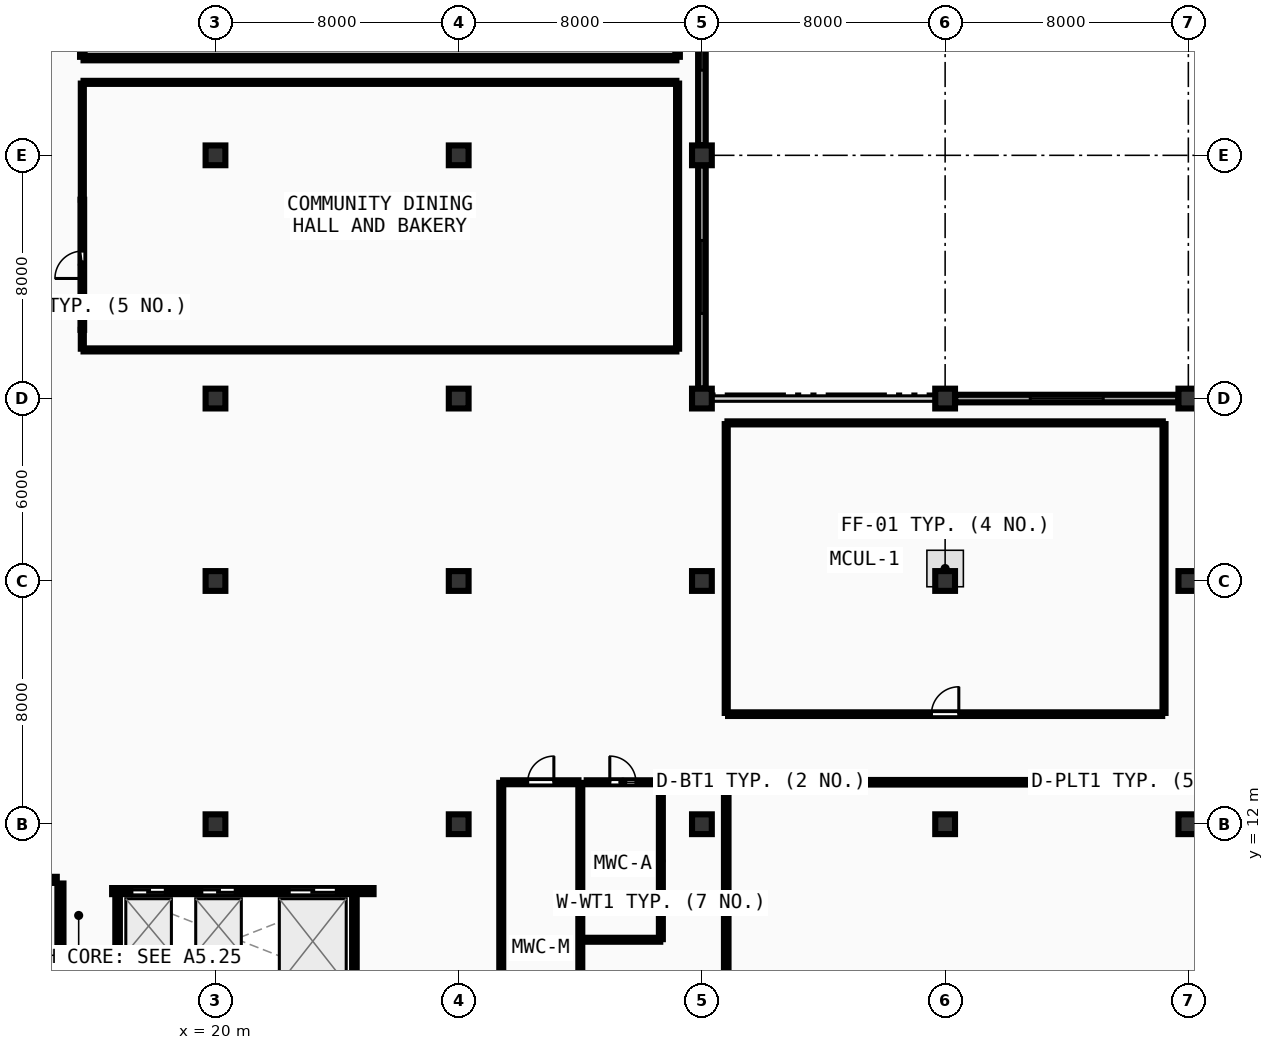
"""IFC4 building model, lengths in metres.
Left out: names, types, materials, properties, quantities, classifications, styles, units other than length and angle.
Written with IfcOpenShell. Run it as: python <this file> out.ifc"""

import sys

from ifc_helpers import new_model, si_unit, direction, frame, frame_2d, origin, origin_2d, place, context, subcontext, project, spatial, rectangle, extrude, element, fill, save


model = new_model("IFC4")
c1 = context("Model", 3, precision=1e-05, world=origin(), true_north=direction((0.0, 1.0)))
c2 = subcontext(c1, "Body", "Model", "MODEL_VIEW")
j1 = project(units=[si_unit("LENGTHUNIT", "METRE"), si_unit("PLANEANGLEUNIT", "RADIAN")], contexts=[c1])
p1 = place(None, origin())
s1 = spatial("IfcSite", under=j1, at=p1, CompositionType="ELEMENT")
p2 = place(p1, origin())
s2 = spatial("IfcBuilding", under=s1, at=p2, CompositionType="ELEMENT")
p3 = place(p2, frame((0.0, 0.0, 13.5)))
s3 = spatial("IfcBuildingStorey", under=s2, at=p3, CompositionType="ELEMENT", Elevation=13.5)
for number, where, z_axis, x_axis in (
    (1, (20.0, 12.0, 0.0), (0.0, 0.0, 1.0), (1.0, 0.0, 0.0)),
    (2, (20.0, 20.0, 0.0), (0.0, 0.0, 1.0), (1.0, 0.0, 0.0)),
    (3, (20.0, 26.0, 0.0), (0.0, 0.0, 1.0), (1.0, 0.0, 0.0)),
    (4, (20.0, 34.0, 0.0), (0.0, 0.0, 1.0), (1.0, 0.0, 0.0)),
    (5, (28.0, 12.0, 0.0), (0.0, 0.0, 1.0), (1.0, 0.0, 0.0)),
    (6, (28.0, 20.0, 0.0), (0.0, 0.0, 1.0), (1.0, 0.0, 0.0)),
    (7, (28.0, 26.0, 0.0), (0.0, 0.0, 1.0), (1.0, 0.0, 0.0)),
    (8, (28.0, 34.0, 0.0), (0.0, 0.0, 1.0), (1.0, 0.0, 0.0)),
    (9, (36.0, 12.0, 0.0), (0.0, 0.0, 1.0), (1.0, 0.0, 0.0)),
    (10, (36.0, 20.0, 0.0), (0.0, 0.0, 1.0), (1.0, 0.0, 0.0)),
    (11, (36.0, 26.0, 0.0), (0.0, 0.0, 1.0), (1.0, 0.0, 0.0)),
    (12, (36.0, 34.0, 0.0), (0.0, 0.0, 1.0), (1.0, 0.0, 0.0)),
    (13, (44.0, 12.0, 0.0), (0.0, 0.0, 1.0), (1.0, 0.0, 0.0)),
    (14, (44.0, 20.0, 0.0), (0.0, 0.0, 1.0), (1.0, 0.0, 0.0)),
    (15, (44.0, 26.0, 0.0), (0.0, 0.0, 1.0), (1.0, 0.0, 0.0)),
    (16, (52.0, 12.0, 0.0), (0.0, 0.0, 1.0), (1.0, 0.0, 0.0)),
    (17, (52.0, 20.0, 0.0), (0.0, 0.0, 1.0), (1.0, 0.0, 0.0)),
    (18, (52.0, 26.0, 0.0), (0.0, 0.0, 1.0), (1.0, 0.0, 0.0)),
):
    element("IfcColumn", number, at=place(p3, frame(where, z_axis=z_axis, x_axis=x_axis)), inside=s3, PredefinedType="COLUMN", context=c2, shape_type="SweptSolid", body=[
        extrude(rectangle(XDim=0.65, YDim=0.65, at=origin_2d()), origin(), (0.0, 0.0, 1.0), 4.5),
    ])
p4 = place(p3, frame((51.67, 26.0, 0.0), z_axis=(0.0, 0.0, 1.0), x_axis=(-1.0, 0.0, 0.0)))
e19 = element("IfcWall", 19, at=p4, inside=s3, PredefinedType="SOLIDWALL", context=c2, shape_type="SweptSolid", body=[
    extrude(rectangle(XDim=7.34, YDim=0.25, at=frame_2d((3.67, 0.0))), origin(), (0.0, 0.0, 1.0), 3.42),
])
p5 = place(p4, frame((2.47, 0.0, 0.95)))
e20 = element("IfcOpeningElement", 20, at=p5, cuts=e19, PredefinedType="OPENING", context=c2, shape_type="SweptSolid", body=[
    extrude(rectangle(XDim=2.4, YDim=1.65, at=frame_2d((1.2, 0.825))), frame((0.0, 0.135, 0.0), z_axis=(0.0, -1.0, 0.0), x_axis=(1.0, 0.0, 0.0)), (0.0, 0.0, 1.0), 0.27),
])
p6 = place(p3, frame((36.0, 26.33, 0.0), z_axis=(0.0, 0.0, 1.0), x_axis=(0.0, 1.0, 0.0)))
e21 = element("IfcWall", 21, at=p6, inside=s3, PredefinedType="SOLIDWALL", context=c2, shape_type="SweptSolid", body=[
    extrude(rectangle(XDim=7.34, YDim=0.25, at=frame_2d((3.67, 0.0))), origin(), (0.0, 0.0, 1.0), 3.42),
])
p7 = place(p6, frame((2.47, 0.0, 0.95)))
e22 = element("IfcOpeningElement", 22, at=p7, cuts=e21, PredefinedType="OPENING", context=c2, shape_type="SweptSolid", body=[
    extrude(rectangle(XDim=2.4, YDim=1.65, at=frame_2d((1.2, 0.825))), frame((0.0, 0.135, 0.0), z_axis=(0.0, -1.0, 0.0), x_axis=(1.0, 0.0, 0.0)), (0.0, 0.0, 1.0), 0.27),
])
p8 = place(p3, frame((36.0, 34.33, 0.0), z_axis=(0.0, 0.0, 1.0), x_axis=(0.0, 1.0, 0.0)))
e23 = element("IfcWall", 23, at=p8, inside=s3, PredefinedType="SOLIDWALL", context=c2, shape_type="SweptSolid", body=[
    extrude(rectangle(XDim=7.34, YDim=0.25, at=frame_2d((3.67, 0.0))), origin(), (0.0, 0.0, 1.0), 3.42),
])
p9 = place(p8, frame((2.47, 0.0, 0.95)))
e24 = element("IfcOpeningElement", 24, at=p9, cuts=e23, PredefinedType="OPENING", context=c2, shape_type="SweptSolid", body=[
    extrude(rectangle(XDim=2.4, YDim=1.65, at=frame_2d((1.2, 0.825))), frame((0.0, 0.135, 0.0), z_axis=(0.0, -1.0, 0.0), x_axis=(1.0, 0.0, 0.0)), (0.0, 0.0, 1.0), 0.27),
])
p10 = place(p3, frame((14.9, 6.58, 0.0), z_axis=(0.0, 0.0, 1.0), x_axis=(0.0, 1.0, 0.0)))
e25 = element("IfcWall", 25, at=p10, inside=s3, PredefinedType="SHEAR", context=c2, shape_type="SweptSolid", body=[
    extrude(rectangle(XDim=3.47, YDim=0.2, at=frame_2d((1.735, 0.0))), origin(), (0.0, 0.0, 1.0), 4.24),
])
p11 = place(p3, frame((14.78, 10.17, 0.0), z_axis=(0.0, 0.0, 1.0), x_axis=(-1.0, 0.0, 0.0)))
e26 = element("IfcWall", 26, at=p11, inside=s3, PredefinedType="SHEAR", context=c2, shape_type="SweptSolid", body=[
    extrude(rectangle(XDim=7.76, YDim=0.2, at=frame_2d((3.88, 0.0))), origin(), (0.0, 0.0, 1.0), 4.24),
])
p12 = place(p11, frame((6.51, 0.0, 0.0)))
e27 = element("IfcOpeningElement", 27, at=p12, cuts=e26, PredefinedType="OPENING", context=c2, shape_type="SweptSolid", body=[
    extrude(rectangle(XDim=1.05, YDim=2.1, at=frame_2d((0.525, 1.05))), frame((0.0, 0.11, 0.0), z_axis=(0.0, -1.0, 0.0), x_axis=(1.0, 0.0, 0.0)), (0.0, 0.0, 1.0), 0.22),
])
p13 = place(p3, frame((16.6, 9.8, 0.0), z_axis=(0.0, 0.0, 1.0), x_axis=(1.0, 0.0, 0.0)))
e28 = element("IfcWall", 28, at=p13, inside=s3, PredefinedType="SOLIDWALL", context=c2, shape_type="SweptSolid", body=[
    extrude(rectangle(XDim=8.6, YDim=0.2, at=frame_2d((4.3, 0.0))), origin(), (0.0, 0.0, 1.0), 3.425),
])
p14 = place(p13, frame((0.65, 0.0, 0.0)))
e29 = element("IfcOpeningElement", 29, at=p14, cuts=e28, PredefinedType="OPENING", context=c2, shape_type="SweptSolid", body=[
    extrude(rectangle(XDim=1.1, YDim=2.1, at=frame_2d((0.55, 1.05))), frame((0.0, 0.11, 0.0), z_axis=(0.0, -1.0, 0.0), x_axis=(1.0, 0.0, 0.0)), (0.0, 0.0, 1.0), 0.22),
])
p15 = place(p13, frame((2.95, 0.0, 0.0)))
e30 = element("IfcOpeningElement", 30, at=p15, cuts=e28, PredefinedType="OPENING", context=c2, shape_type="SweptSolid", body=[
    extrude(rectangle(XDim=1.1, YDim=2.1, at=frame_2d((0.55, 1.05))), frame((0.0, 0.11, 0.0), z_axis=(0.0, -1.0, 0.0), x_axis=(1.0, 0.0, 0.0)), (0.0, 0.0, 1.0), 0.22),
])
p16 = place(p13, frame((5.825, 0.0, 0.0)))
e31 = element("IfcOpeningElement", 31, at=p16, cuts=e28, PredefinedType="OPENING", context=c2, shape_type="SweptSolid", body=[
    extrude(rectangle(XDim=1.55, YDim=2.2, at=frame_2d((0.775, 1.1))), frame((0.0, 0.11, 0.0), z_axis=(0.0, -1.0, 0.0), x_axis=(1.0, 0.0, 0.0)), (0.0, 0.0, 1.0), 0.22),
])
for number, where, z_axis, x_axis in (
    (32, (16.78, 6.76, 0.0), (0.0, 0.0, 1.0), (0.0, 1.0, 0.0)),
    (33, (24.57, 6.76, 0.0), (0.0, 0.0, 1.0), (0.0, 1.0, 0.0)),
):
    element("IfcWall", number, at=place(p3, frame(where, z_axis=z_axis, x_axis=x_axis)), inside=s3, PredefinedType="PARTITIONING", context=c2, shape_type="SweptSolid", body=[
        extrude(rectangle(XDim=2.91, YDim=0.15, at=frame_2d((1.455, 0.0))), origin(), (0.0, 0.0, 1.0), 4.23),
    ])
p17 = place(p3, frame((29.46, 13.38, 0.0), z_axis=(0.0, 0.0, 1.0), x_axis=(1.0, 0.0, 0.0)))
e34 = element("IfcWall", 34, at=p17, inside=s3, PredefinedType="PLUMBINGWALL", context=c2, shape_type="SweptSolid", body=[
    extrude(rectangle(XDim=2.48, YDim=0.13, at=frame_2d((1.24, 0.0))), origin(), (0.0, 0.0, 1.0), 4.09),
])
p18 = place(p17, frame((0.81, 0.0, 0.0)))
e35 = element("IfcOpeningElement", 35, at=p18, cuts=e34, PredefinedType="OPENING", context=c2, shape_type="SweptSolid", body=[
    extrude(rectangle(XDim=0.86, YDim=2.05, at=frame_2d((0.43, 1.025))), frame((0.0, 0.075, 0.0), z_axis=(0.0, -1.0, 0.0), x_axis=(1.0, 0.0, 0.0)), (0.0, 0.0, 1.0), 0.15),
])
p19 = place(p3, frame((32.21, 13.38, 0.0), z_axis=(0.0, 0.0, 1.0), x_axis=(1.0, 0.0, 0.0)))
e36 = element("IfcWall", 36, at=p19, inside=s3, PredefinedType="PLUMBINGWALL", context=c2, shape_type="SweptSolid", body=[
    extrude(rectangle(XDim=2.38, YDim=0.13, at=frame_2d((1.19, 0.0))), origin(), (0.0, 0.0, 1.0), 4.09),
])
p20 = place(p19, frame((0.76, 0.0, 0.0)))
e37 = element("IfcOpeningElement", 37, at=p20, cuts=e36, PredefinedType="OPENING", context=c2, shape_type="SweptSolid", body=[
    extrude(rectangle(XDim=0.86, YDim=2.05, at=frame_2d((0.43, 1.025))), frame((0.0, 0.075, 0.0), z_axis=(0.0, -1.0, 0.0), x_axis=(1.0, 0.0, 0.0)), (0.0, 0.0, 1.0), 0.15),
])
p21 = place(p3, frame((36.86, 15.62, 0.0), z_axis=(0.0, 0.0, 1.0), x_axis=(1.0, 0.0, 0.0)))
e38 = element("IfcWall", 38, at=p21, inside=s3, PredefinedType="PARTITIONING", context=c2, shape_type="SweptSolid", body=[
    extrude(rectangle(XDim=14.28, YDim=0.12, at=frame_2d((7.14, 0.0))), origin(), (0.0, 0.0, 1.0), 3.425),
])
p22 = place(p21, frame((6.69, 0.0, 0.0)))
e39 = element("IfcOpeningElement", 39, at=p22, cuts=e38, PredefinedType="OPENING", context=c2, shape_type="SweptSolid", body=[
    extrude(rectangle(XDim=0.9, YDim=2.08, at=frame_2d((0.45, 1.04))), frame((0.0, 0.07, 0.0), z_axis=(0.0, -1.0, 0.0), x_axis=(1.0, 0.0, 0.0)), (0.0, 0.0, 1.0), 0.14),
])
p23 = place(p3, frame((15.62, 28.26, 0.0), z_axis=(0.0, 0.0, 1.0), x_axis=(0.0, 1.0, 0.0)))
e40 = element("IfcWall", 40, at=p23, inside=s3, PredefinedType="PARTITIONING", context=c2, shape_type="SweptSolid", body=[
    extrude(rectangle(XDim=4.28, YDim=0.12, at=frame_2d((2.14, 0.0))), origin(), (0.0, 0.0, 1.0), 4.09),
])
p24 = place(p23, frame((1.69, 0.0, 0.0)))
e41 = element("IfcOpeningElement", 41, at=p24, cuts=e40, PredefinedType="OPENING", context=c2, shape_type="SweptSolid", body=[
    extrude(rectangle(XDim=0.9, YDim=2.08, at=frame_2d((0.45, 1.04))), frame((0.0, 0.07, 0.0), z_axis=(0.0, -1.0, 0.0), x_axis=(1.0, 0.0, 0.0)), (0.0, 0.0, 1.0), 0.14),
])
p25 = place(p3, frame((36.86, 13.38, 0.0), z_axis=(0.0, 0.0, 1.0), x_axis=(1.0, 0.0, 0.0)))
e42 = element("IfcWall", 42, at=p25, inside=s3, PredefinedType="PARTITIONING", context=c2, shape_type="SweptSolid", body=[
    extrude(rectangle(XDim=36.68, YDim=0.15, at=frame_2d((18.34, 0.0))), origin(), (0.0, 0.0, 1.0), 3.425),
])
p26 = place(p25, frame((17.8, 0.0, 0.0)))
e43 = element("IfcOpeningElement", 43, at=p26, cuts=e42, PredefinedType="OPENING", context=c2, shape_type="SweptSolid", body=[
    extrude(rectangle(XDim=1.08, YDim=2.1, at=frame_2d((0.54, 1.05))), frame((0.0, 0.085, 0.0), z_axis=(0.0, -1.0, 0.0), x_axis=(1.0, 0.0, 0.0)), (0.0, 0.0, 1.0), 0.17),
])
for number, where, z_axis, x_axis in (
    (44, (32.0, 5.22, 0.0), (0.0, 0.0, 1.0), (0.0, 1.0, 0.0)),
    (45, (29.4, 13.36, 0.0), (0.0, 0.0, 1.0), (0.0, -1.0, 0.0)),
):
    element("IfcWall", number, at=place(p3, frame(where, z_axis=z_axis, x_axis=x_axis)), inside=s3, PredefinedType="PLUMBINGWALL", context=c2, shape_type="SweptSolid", body=[
        extrude(rectangle(XDim=8.14, YDim=0.13, at=frame_2d((4.07, 0.0))), origin(), (0.0, 0.0, 1.0), 3.425),
    ])
p27 = place(p3, frame((32.17, 8.2, 0.0), z_axis=(0.0, 0.0, 1.0), x_axis=(1.0, 0.0, 0.0)))
e46 = element("IfcWall", 46, at=p27, inside=s3, PredefinedType="PLUMBINGWALL", context=c2, shape_type="SweptSolid", body=[
    extrude(rectangle(XDim=2.46, YDim=0.13, at=frame_2d((1.23, 0.0))), origin(), (0.0, 0.0, 1.0), 4.09),
])
p28 = place(p3, frame((34.65, 8.22, 0.0), z_axis=(0.0, 0.0, 1.0), x_axis=(0.0, 1.0, 0.0)))
e47 = element("IfcWall", 47, at=p28, inside=s3, PredefinedType="PLUMBINGWALL", context=c2, shape_type="SweptSolid", body=[
    extrude(rectangle(XDim=5.14, YDim=0.13, at=frame_2d((2.57, 0.0))), origin(), (0.0, 0.0, 1.0), 3.425),
])
p29 = place(p3, frame((51.2, 15.66, 0.0), z_axis=(0.0, 0.0, 1.0), x_axis=(0.0, 1.0, 0.0)))
e48 = element("IfcWall", 48, at=p29, inside=s3, PredefinedType="PARTITIONING", context=c2, shape_type="SweptSolid", body=[
    extrude(rectangle(XDim=9.5, YDim=0.1, at=frame_2d((4.75, 0.0))), origin(), (0.0, 0.0, 1.0), 3.425),
])
p30 = place(p3, frame((51.16, 25.2, 0.0), z_axis=(0.0, 0.0, 1.0), x_axis=(-1.0, 0.0, 0.0)))
e49 = element("IfcWall", 49, at=p30, inside=s3, PredefinedType="PARTITIONING", context=c2, shape_type="SweptSolid", body=[
    extrude(rectangle(XDim=14.32, YDim=0.1, at=frame_2d((7.16, 0.0))), origin(), (0.0, 0.0, 1.0), 3.425),
])
p31 = place(p3, frame((36.8, 25.16, 0.0), z_axis=(0.0, 0.0, 1.0), x_axis=(0.0, -1.0, 0.0)))
e50 = element("IfcWall", 50, at=p31, inside=s3, PredefinedType="PARTITIONING", context=c2, shape_type="SweptSolid", body=[
    extrude(rectangle(XDim=9.5, YDim=0.1, at=frame_2d((4.75, 0.0))), origin(), (0.0, 0.0, 1.0), 3.425),
])
p32 = place(p3, frame((15.66, 27.6, 0.0), z_axis=(0.0, 0.0, 1.0), x_axis=(1.0, 0.0, 0.0)))
e51 = element("IfcWall", 51, at=p32, inside=s3, PredefinedType="PARTITIONING", context=c2, shape_type="SweptSolid", body=[
    extrude(rectangle(XDim=19.5, YDim=0.1, at=frame_2d((9.75, 0.0))), origin(), (0.0, 0.0, 1.0), 3.425),
])
p33 = place(p3, frame((35.2, 27.64, 0.0), z_axis=(0.0, 0.0, 1.0), x_axis=(0.0, 1.0, 0.0)))
e52 = element("IfcWall", 52, at=p33, inside=s3, PredefinedType="PARTITIONING", context=c2, shape_type="SweptSolid", body=[
    extrude(rectangle(XDim=8.72, YDim=0.1, at=frame_2d((4.36, 0.0))), origin(), (0.0, 0.0, 1.0), 3.425),
])
p34 = place(p3, frame((35.16, 36.4, 0.0), z_axis=(0.0, 0.0, 1.0), x_axis=(-1.0, 0.0, 0.0)))
e53 = element("IfcWall", 53, at=p34, inside=s3, PredefinedType="PARTITIONING", context=c2, shape_type="SweptSolid", body=[
    extrude(rectangle(XDim=19.5, YDim=0.1, at=frame_2d((9.75, 0.0))), origin(), (0.0, 0.0, 1.0), 3.425),
])
p35 = place(p3, frame((15.62, 36.36, 0.0), z_axis=(0.0, 0.0, 1.0), x_axis=(0.0, -1.0, 0.0)))
e54 = element("IfcWall", 54, at=p35, inside=s3, PredefinedType="PARTITIONING", context=c2, shape_type="SweptSolid", body=[
    extrude(rectangle(XDim=3.82, YDim=0.1, at=frame_2d((1.91, 0.0))), origin(), (0.0, 0.0, 1.0), 3.425),
])
p36 = place(p3, frame((15.62, 28.26, 0.0), z_axis=(0.0, 0.0, 1.0), x_axis=(0.0, -1.0, 0.0)))
e55 = element("IfcWall", 55, at=p36, inside=s3, PredefinedType="PARTITIONING", context=c2, shape_type="SweptSolid", body=[
    extrude(rectangle(XDim=0.62, YDim=0.1, at=frame_2d((0.31, 0.0))), origin(), (0.0, 0.0, 1.0), 4.09),
])
p37 = place(p3, frame((15.66, 37.2, 0.0), z_axis=(0.0, 0.0, 1.0), x_axis=(1.0, 0.0, 0.0)))
e56 = element("IfcWall", 56, at=p37, inside=s3, PredefinedType="PARTITIONING", context=c2, shape_type="SweptSolid", body=[
    extrude(rectangle(XDim=19.5, YDim=0.15, at=frame_2d((9.75, 0.0))), origin(), (0.0, 0.0, 1.0), 3.425),
])
p38 = place(p3, frame((35.2, 37.24, 0.0), z_axis=(0.0, 0.0, 1.0), x_axis=(0.0, 1.0, 0.0)))
e57 = element("IfcWall", 57, at=p38, inside=s3, PredefinedType="PARTITIONING", context=c2, shape_type="SweptSolid", body=[
    extrude(rectangle(XDim=43.92, YDim=0.15, at=frame_2d((21.96, 0.0))), origin(), (0.0, 0.0, 1.0), 3.425),
])
p39 = place(p3, frame((15.62, 43.46, 0.0), z_axis=(0.0, 0.0, 1.0), x_axis=(0.0, -1.0, 0.0)))
e58 = element("IfcWall", 58, at=p39, inside=s3, PredefinedType="PARTITIONING", context=c2, shape_type="SweptSolid", body=[
    extrude(rectangle(XDim=6.22, YDim=0.15, at=frame_2d((3.11, 0.0))), origin(), (0.0, 0.0, 1.0), 3.425),
])
p40 = place(p3, frame((36.8, 13.34, 0.0), z_axis=(0.0, 0.0, 1.0), x_axis=(0.0, -1.0, 0.0)))
e59 = element("IfcWall", 59, at=p40, inside=s3, PredefinedType="PARTITIONING", context=c2, shape_type="SweptSolid", body=[
    extrude(rectangle(XDim=8.5, YDim=0.15, at=frame_2d((4.25, 0.0))), origin(), (0.0, 0.0, 1.0), 3.425),
])
p41 = place(p5, origin())
e60 = element("IfcWindow", 60, at=p41, inside=s3, PartitioningType="SINGLE_PANEL", PredefinedType="WINDOW", context=c2, shape_type="SweptSolid", body=[
    extrude(rectangle(XDim=2.4, YDim=1.65, at=frame_2d((1.2, 0.825))), frame((0.0, 0.03, 0.0), z_axis=(0.0, -1.0, 0.0), x_axis=(1.0, 0.0, 0.0)), (0.0, 0.0, 1.0), 0.06),
])
fill(e20, e60)
p42 = place(p7, origin())
e61 = element("IfcWindow", 61, at=p42, inside=s3, PartitioningType="SINGLE_PANEL", PredefinedType="WINDOW", context=c2, shape_type="SweptSolid", body=[
    extrude(rectangle(XDim=2.4, YDim=1.65, at=frame_2d((1.2, 0.825))), frame((0.0, 0.03, 0.0), z_axis=(0.0, -1.0, 0.0), x_axis=(1.0, 0.0, 0.0)), (0.0, 0.0, 1.0), 0.06),
])
fill(e22, e61)
p43 = place(p9, origin())
e62 = element("IfcWindow", 62, at=p43, inside=s3, PartitioningType="SINGLE_PANEL", PredefinedType="WINDOW", context=c2, shape_type="SweptSolid", body=[
    extrude(rectangle(XDim=2.4, YDim=1.65, at=frame_2d((1.2, 0.825))), frame((0.0, 0.03, 0.0), z_axis=(0.0, -1.0, 0.0), x_axis=(1.0, 0.0, 0.0)), (0.0, 0.0, 1.0), 0.06),
])
fill(e24, e62)
p44 = place(p14, origin())
e63 = element("IfcDoor", 63, at=p44, inside=s3, OperationType="DOUBLE_DOOR_SLIDING", PredefinedType="DOOR", context=c2, shape_type="SweptSolid", body=[
    extrude(rectangle(XDim=1.1, YDim=2.1, at=frame_2d((0.55, 1.05))), frame((0.0, 0.025, 0.0), z_axis=(0.0, -1.0, 0.0), x_axis=(1.0, 0.0, 0.0)), (0.0, 0.0, 1.0), 0.05),
])
fill(e29, e63)
p45 = place(p15, origin())
e64 = element("IfcDoor", 64, at=p45, inside=s3, OperationType="DOUBLE_DOOR_SLIDING", PredefinedType="DOOR", context=c2, shape_type="SweptSolid", body=[
    extrude(rectangle(XDim=1.1, YDim=2.1, at=frame_2d((0.55, 1.05))), frame((0.0, 0.025, 0.0), z_axis=(0.0, -1.0, 0.0), x_axis=(1.0, 0.0, 0.0)), (0.0, 0.0, 1.0), 0.05),
])
fill(e30, e64)
p46 = place(p16, origin())
e65 = element("IfcDoor", 65, at=p46, inside=s3, OperationType="DOUBLE_DOOR_SLIDING", PredefinedType="DOOR", context=c2, shape_type="SweptSolid", body=[
    extrude(rectangle(XDim=1.55, YDim=2.2, at=frame_2d((0.775, 1.1))), frame((0.0, 0.025, 0.0), z_axis=(0.0, -1.0, 0.0), x_axis=(1.0, 0.0, 0.0)), (0.0, 0.0, 1.0), 0.05),
])
fill(e31, e65)
p47 = place(p18, origin())
e66 = element("IfcDoor", 66, at=p47, inside=s3, OperationType="SINGLE_SWING_RIGHT", PredefinedType="DOOR", context=c2, shape_type="SweptSolid", body=[
    extrude(rectangle(XDim=0.86, YDim=2.05, at=frame_2d((0.43, 1.025))), frame((0.0, 0.025, 0.0), z_axis=(0.0, -1.0, 0.0), x_axis=(1.0, 0.0, 0.0)), (0.0, 0.0, 1.0), 0.05),
])
fill(e35, e66)
p48 = place(p20, origin())
e67 = element("IfcDoor", 67, at=p48, inside=s3, OperationType="SINGLE_SWING_LEFT", PredefinedType="DOOR", context=c2, shape_type="SweptSolid", body=[
    extrude(rectangle(XDim=0.86, YDim=2.05, at=frame_2d((0.43, 1.025))), frame((0.0, 0.025, 0.0), z_axis=(0.0, -1.0, 0.0), x_axis=(1.0, 0.0, 0.0)), (0.0, 0.0, 1.0), 0.05),
])
fill(e37, e67)
p49 = place(p22, origin())
e68 = element("IfcDoor", 68, at=p49, inside=s3, OperationType="SINGLE_SWING_RIGHT", PredefinedType="DOOR", context=c2, shape_type="SweptSolid", body=[
    extrude(rectangle(XDim=0.9, YDim=2.08, at=frame_2d((0.45, 1.04))), frame((0.0, 0.025, 0.0), z_axis=(0.0, -1.0, 0.0), x_axis=(1.0, 0.0, 0.0)), (0.0, 0.0, 1.0), 0.05),
])
fill(e39, e68)
p50 = place(p24, origin())
e69 = element("IfcDoor", 69, at=p50, inside=s3, OperationType="SINGLE_SWING_LEFT", PredefinedType="DOOR", context=c2, shape_type="SweptSolid", body=[
    extrude(rectangle(XDim=0.9, YDim=2.08, at=frame_2d((0.45, 1.04))), frame((0.0, 0.025, 0.0), z_axis=(0.0, -1.0, 0.0), x_axis=(1.0, 0.0, 0.0)), (0.0, 0.0, 1.0), 0.05),
])
fill(e41, e69)
save(model, sys.argv[1])
